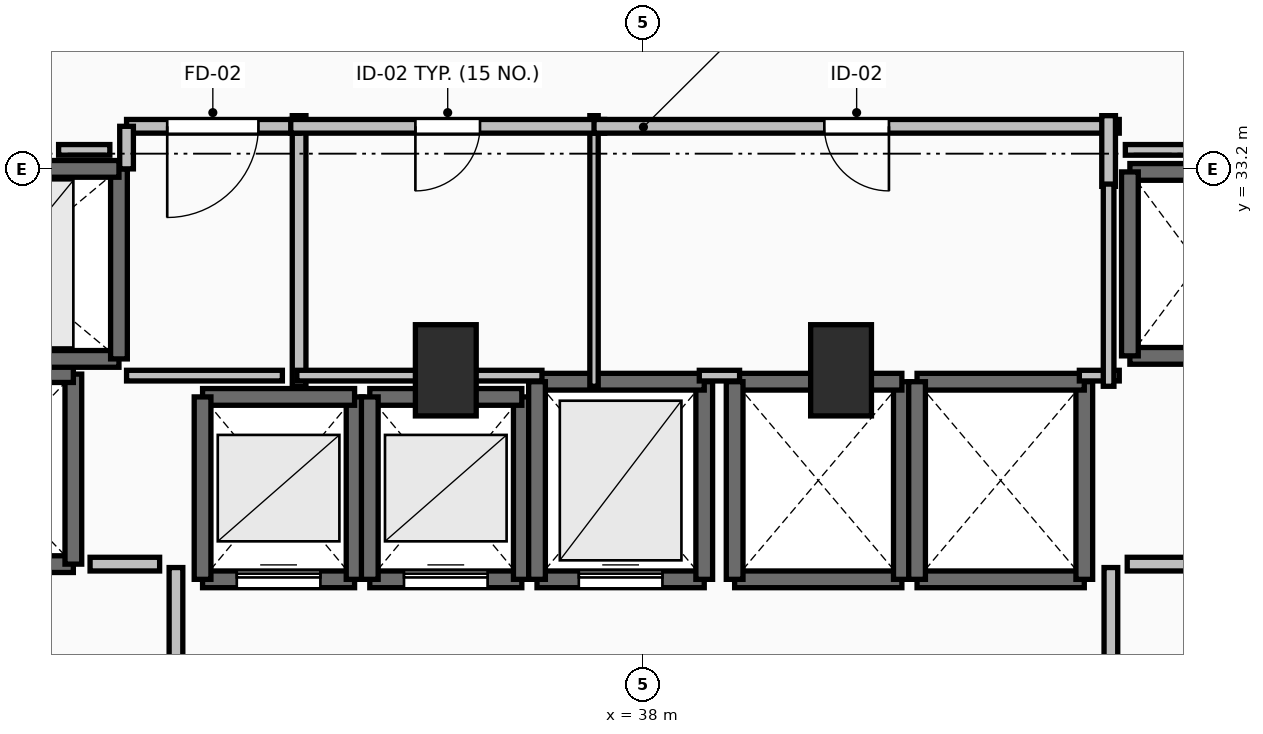
"""IFC4 building model, lengths in metres.
Left out: names, types, materials, properties, quantities, classifications, styles, units other than length and angle.
Written with IfcOpenShell. Run it as: python <this file> out.ifc"""

import sys

from ifc_helpers import new_model, si_unit, direction, frame, frame_2d, origin, origin_2d, place, context, subcontext, project, spatial, rectangle, extrude, element, fill, save


model = new_model("IFC4")
c1 = context("Model", 3, precision=1e-05, world=origin(), true_north=direction((0.0, 1.0)))
c2 = subcontext(c1, "Body", "Model", "MODEL_VIEW")
j1 = project(units=[si_unit("LENGTHUNIT", "METRE"), si_unit("PLANEANGLEUNIT", "RADIAN")], contexts=[c1])
p1 = place(None, origin())
s1 = spatial("IfcSite", under=j1, at=p1, CompositionType="ELEMENT")
p2 = place(p1, origin())
s2 = spatial("IfcBuilding", under=s1, at=p2, CompositionType="ELEMENT")
p3 = place(p2, frame((0.0, 0.0, 62.5)))
s3 = spatial("IfcBuildingStorey", under=s2, at=p3, CompositionType="ELEMENT", Elevation=62.5)
for number, where, z_axis, x_axis in (
    (1, (35.4, 30.55, 0.0), (0.0, 0.0, 1.0), (1.0, 0.0, 0.0)),
    (2, (40.6, 30.55, 0.0), (0.0, 0.0, 1.0), (1.0, 0.0, 0.0)),
):
    element("IfcColumn", number, at=place(p3, frame(where, z_axis=z_axis, x_axis=x_axis)), inside=s3, PredefinedType="PILASTER", context=c2, shape_type="SweptSolid", body=[
        extrude(rectangle(XDim=0.8, YDim=1.2, at=origin_2d()), origin(), (0.0, 0.0, 1.0), 3.5),
    ])
p4 = place(p3, frame((32.2, 27.8, 0.0), z_axis=(0.0, 0.0, 1.0), x_axis=(1.0, 0.0, 0.0)))
e3 = element("IfcWall", 3, at=p4, inside=s3, PredefinedType="SOLIDWALL", context=c2, shape_type="SweptSolid", body=[
    extrude(rectangle(XDim=2.0, YDim=0.22, at=frame_2d((1.0, 0.0))), origin(), (0.0, 0.0, 1.0), 3.24),
])
p5 = place(p4, frame((0.45, 0.0, 0.0)))
e4 = element("IfcOpeningElement", 4, at=p5, cuts=e3, PredefinedType="OPENING", context=c2, shape_type="SweptSolid", body=[
    extrude(rectangle(XDim=1.1, YDim=2.2, at=frame_2d((0.55, 1.1))), frame((0.0, 0.125, 0.0), z_axis=(0.0, -1.0, 0.0), x_axis=(1.0, 0.0, 0.0)), (0.0, 0.0, 1.0), 0.25),
])
p6 = place(p3, frame((34.2, 27.8, 0.0), z_axis=(0.0, 0.0, 1.0), x_axis=(0.0, 1.0, 0.0)))
e5 = element("IfcWall", 5, at=p6, inside=s3, PredefinedType="SOLIDWALL", context=c2, shape_type="SweptSolid", body=[
    extrude(rectangle(XDim=2.4, YDim=0.22, at=frame_2d((1.2, 0.0))), origin(), (0.0, 0.0, 1.0), 3.24),
])
p7 = place(p3, frame((34.2, 30.2, 0.0), z_axis=(0.0, 0.0, 1.0), x_axis=(-1.0, 0.0, 0.0)))
e6 = element("IfcWall", 6, at=p7, inside=s3, PredefinedType="SOLIDWALL", context=c2, shape_type="SweptSolid", body=[
    extrude(rectangle(XDim=2.0, YDim=0.22, at=frame_2d((1.0, 0.0))), origin(), (0.0, 0.0, 1.0), 3.24),
])
p8 = place(p3, frame((32.2, 30.2, 0.0), z_axis=(0.0, 0.0, 1.0), x_axis=(0.0, -1.0, 0.0)))
e7 = element("IfcWall", 7, at=p8, inside=s3, PredefinedType="SOLIDWALL", context=c2, shape_type="SweptSolid", body=[
    extrude(rectangle(XDim=2.4, YDim=0.22, at=frame_2d((1.2, 0.0))), origin(), (0.0, 0.0, 1.0), 3.24),
])
p9 = place(p3, frame((34.4, 27.8, 0.0), z_axis=(0.0, 0.0, 1.0), x_axis=(1.0, 0.0, 0.0)))
e8 = element("IfcWall", 8, at=p9, inside=s3, PredefinedType="SOLIDWALL", context=c2, shape_type="SweptSolid", body=[
    extrude(rectangle(XDim=2.0, YDim=0.22, at=frame_2d((1.0, 0.0))), origin(), (0.0, 0.0, 1.0), 3.24),
])
p10 = place(p9, frame((0.45, 0.0, 0.0)))
e9 = element("IfcOpeningElement", 9, at=p10, cuts=e8, PredefinedType="OPENING", context=c2, shape_type="SweptSolid", body=[
    extrude(rectangle(XDim=1.1, YDim=2.2, at=frame_2d((0.55, 1.1))), frame((0.0, 0.125, 0.0), z_axis=(0.0, -1.0, 0.0), x_axis=(1.0, 0.0, 0.0)), (0.0, 0.0, 1.0), 0.25),
])
p11 = place(p3, frame((36.4, 27.8, 0.0), z_axis=(0.0, 0.0, 1.0), x_axis=(0.0, 1.0, 0.0)))
e10 = element("IfcWall", 10, at=p11, inside=s3, PredefinedType="SOLIDWALL", context=c2, shape_type="SweptSolid", body=[
    extrude(rectangle(XDim=2.4, YDim=0.22, at=frame_2d((1.2, 0.0))), origin(), (0.0, 0.0, 1.0), 3.24),
])
p12 = place(p3, frame((36.4, 30.2, 0.0), z_axis=(0.0, 0.0, 1.0), x_axis=(-1.0, 0.0, 0.0)))
e11 = element("IfcWall", 11, at=p12, inside=s3, PredefinedType="SOLIDWALL", context=c2, shape_type="SweptSolid", body=[
    extrude(rectangle(XDim=2.0, YDim=0.22, at=frame_2d((1.0, 0.0))), origin(), (0.0, 0.0, 1.0), 3.24),
])
p13 = place(p3, frame((34.4, 30.2, 0.0), z_axis=(0.0, 0.0, 1.0), x_axis=(0.0, -1.0, 0.0)))
e12 = element("IfcWall", 12, at=p13, inside=s3, PredefinedType="SOLIDWALL", context=c2, shape_type="SweptSolid", body=[
    extrude(rectangle(XDim=2.4, YDim=0.22, at=frame_2d((1.2, 0.0))), origin(), (0.0, 0.0, 1.0), 3.24),
])
p14 = place(p3, frame((36.6, 27.8, 0.0), z_axis=(0.0, 0.0, 1.0), x_axis=(1.0, 0.0, 0.0)))
e13 = element("IfcWall", 13, at=p14, inside=s3, PredefinedType="SOLIDWALL", context=c2, shape_type="SweptSolid", body=[
    extrude(rectangle(XDim=2.2, YDim=0.22, at=frame_2d((1.1, 0.0))), origin(), (0.0, 0.0, 1.0), 3.24),
])
p15 = place(p14, frame((0.55, 0.0, 0.0)))
e14 = element("IfcOpeningElement", 14, at=p15, cuts=e13, PredefinedType="OPENING", context=c2, shape_type="SweptSolid", body=[
    extrude(rectangle(XDim=1.1, YDim=2.2, at=frame_2d((0.55, 1.1))), frame((0.0, 0.125, 0.0), z_axis=(0.0, -1.0, 0.0), x_axis=(1.0, 0.0, 0.0)), (0.0, 0.0, 1.0), 0.25),
])
p16 = place(p3, frame((38.8, 27.8, 0.0), z_axis=(0.0, 0.0, 1.0), x_axis=(0.0, 1.0, 0.0)))
e15 = element("IfcWall", 15, at=p16, inside=s3, PredefinedType="SOLIDWALL", context=c2, shape_type="SweptSolid", body=[
    extrude(rectangle(XDim=2.6, YDim=0.22, at=frame_2d((1.3, 0.0))), origin(), (0.0, 0.0, 1.0), 3.24),
])
p17 = place(p3, frame((38.8, 30.4, 0.0), z_axis=(0.0, 0.0, 1.0), x_axis=(-1.0, 0.0, 0.0)))
e16 = element("IfcWall", 16, at=p17, inside=s3, PredefinedType="SOLIDWALL", context=c2, shape_type="SweptSolid", body=[
    extrude(rectangle(XDim=2.2, YDim=0.22, at=frame_2d((1.1, 0.0))), origin(), (0.0, 0.0, 1.0), 3.24),
])
p18 = place(p3, frame((36.6, 30.4, 0.0), z_axis=(0.0, 0.0, 1.0), x_axis=(0.0, -1.0, 0.0)))
e17 = element("IfcWall", 17, at=p18, inside=s3, PredefinedType="SOLIDWALL", context=c2, shape_type="SweptSolid", body=[
    extrude(rectangle(XDim=2.6, YDim=0.22, at=frame_2d((1.3, 0.0))), origin(), (0.0, 0.0, 1.0), 3.24),
])
p19 = place(p3, frame((39.2, 27.8, 0.0), z_axis=(0.0, 0.0, 1.0), x_axis=(1.0, 0.0, 0.0)))
e18 = element("IfcWall", 18, at=p19, inside=s3, PredefinedType="SOLIDWALL", context=c2, shape_type="SweptSolid", body=[
    extrude(rectangle(XDim=2.2, YDim=0.22, at=frame_2d((1.1, 0.0))), origin(), (0.0, 0.0, 1.0), 3.24),
])
p20 = place(p3, frame((41.4, 27.8, 0.0), z_axis=(0.0, 0.0, 1.0), x_axis=(0.0, 1.0, 0.0)))
e19 = element("IfcWall", 19, at=p20, inside=s3, PredefinedType="SOLIDWALL", context=c2, shape_type="SweptSolid", body=[
    extrude(rectangle(XDim=2.6, YDim=0.22, at=frame_2d((1.3, 0.0))), origin(), (0.0, 0.0, 1.0), 3.24),
])
p21 = place(p3, frame((41.4, 30.4, 0.0), z_axis=(0.0, 0.0, 1.0), x_axis=(-1.0, 0.0, 0.0)))
e20 = element("IfcWall", 20, at=p21, inside=s3, PredefinedType="SOLIDWALL", context=c2, shape_type="SweptSolid", body=[
    extrude(rectangle(XDim=2.2, YDim=0.22, at=frame_2d((1.1, 0.0))), origin(), (0.0, 0.0, 1.0), 3.24),
])
p22 = place(p3, frame((39.2, 30.4, 0.0), z_axis=(0.0, 0.0, 1.0), x_axis=(0.0, -1.0, 0.0)))
e21 = element("IfcWall", 21, at=p22, inside=s3, PredefinedType="SOLIDWALL", context=c2, shape_type="SweptSolid", body=[
    extrude(rectangle(XDim=2.6, YDim=0.22, at=frame_2d((1.3, 0.0))), origin(), (0.0, 0.0, 1.0), 3.24),
])
p23 = place(p3, frame((41.6, 27.8, 0.0), z_axis=(0.0, 0.0, 1.0), x_axis=(1.0, 0.0, 0.0)))
e22 = element("IfcWall", 22, at=p23, inside=s3, PredefinedType="SOLIDWALL", context=c2, shape_type="SweptSolid", body=[
    extrude(rectangle(XDim=2.2, YDim=0.22, at=frame_2d((1.1, 0.0))), origin(), (0.0, 0.0, 1.0), 3.24),
])
p24 = place(p3, frame((43.8, 27.8, 0.0), z_axis=(0.0, 0.0, 1.0), x_axis=(0.0, 1.0, 0.0)))
e23 = element("IfcWall", 23, at=p24, inside=s3, PredefinedType="SOLIDWALL", context=c2, shape_type="SweptSolid", body=[
    extrude(rectangle(XDim=2.6, YDim=0.22, at=frame_2d((1.3, 0.0))), origin(), (0.0, 0.0, 1.0), 3.24),
])
p25 = place(p3, frame((43.8, 30.4, 0.0), z_axis=(0.0, 0.0, 1.0), x_axis=(-1.0, 0.0, 0.0)))
e24 = element("IfcWall", 24, at=p25, inside=s3, PredefinedType="SOLIDWALL", context=c2, shape_type="SweptSolid", body=[
    extrude(rectangle(XDim=2.2, YDim=0.22, at=frame_2d((1.1, 0.0))), origin(), (0.0, 0.0, 1.0), 3.24),
])
p26 = place(p3, frame((41.6, 30.4, 0.0), z_axis=(0.0, 0.0, 1.0), x_axis=(0.0, -1.0, 0.0)))
e25 = element("IfcWall", 25, at=p26, inside=s3, PredefinedType="SOLIDWALL", context=c2, shape_type="SweptSolid", body=[
    extrude(rectangle(XDim=2.6, YDim=0.22, at=frame_2d((1.3, 0.0))), origin(), (0.0, 0.0, 1.0), 3.24),
])
for number, where, z_axis, x_axis in (
    (26, (44.4, 30.74, 0.0), (0.0, 0.0, 1.0), (1.0, 0.0, 0.0)),
    (27, (46.2, 33.16, 0.0), (0.0, 0.0, 1.0), (-1.0, 0.0, 0.0)),
):
    element("IfcWall", number, at=place(p3, frame(where, z_axis=z_axis, x_axis=x_axis)), inside=s3, PredefinedType="SOLIDWALL", context=c2, shape_type="SweptSolid", body=[
        extrude(rectangle(XDim=1.8, YDim=0.22, at=frame_2d((0.9, 0.0))), origin(), (0.0, 0.0, 1.0), 3.24),
    ])
p27 = place(p3, frame((44.4, 33.16, 0.0), z_axis=(0.0, 0.0, 1.0), x_axis=(0.0, -1.0, 0.0)))
e28 = element("IfcWall", 28, at=p27, inside=s3, PredefinedType="SOLIDWALL", context=c2, shape_type="SweptSolid", body=[
    extrude(rectangle(XDim=2.42, YDim=0.22, at=frame_2d((1.21, 0.0))), origin(), (0.0, 0.0, 1.0), 3.24),
])
p28 = place(p3, frame((28.1, 28.0, 0.0), z_axis=(0.0, 0.0, 1.0), x_axis=(1.0, 0.0, 0.0)))
e29 = element("IfcWall", 29, at=p28, inside=s3, PredefinedType="SHEAR", context=c2, shape_type="SweptSolid", body=[
    extrude(rectangle(XDim=2.4, YDim=0.22, at=frame_2d((1.2, 0.0))), origin(), (0.0, 0.0, 1.0), 3.24),
])
p29 = place(p28, frame((0.6, 0.0, 0.0)))
e30 = element("IfcOpeningElement", 30, at=p29, cuts=e29, PredefinedType="OPENING", context=c2, shape_type="SweptSolid", body=[
    extrude(rectangle(XDim=1.2, YDim=2.2, at=frame_2d((0.6, 1.1))), frame((0.0, 0.125, 0.0), z_axis=(0.0, -1.0, 0.0), x_axis=(1.0, 0.0, 0.0)), (0.0, 0.0, 1.0), 0.25),
])
p30 = place(p3, frame((30.5, 28.0, 0.0), z_axis=(0.0, 0.0, 1.0), x_axis=(0.0, 1.0, 0.0)))
e31 = element("IfcWall", 31, at=p30, inside=s3, PredefinedType="SHEAR", context=c2, shape_type="SweptSolid", body=[
    extrude(rectangle(XDim=2.5, YDim=0.22, at=frame_2d((1.25, 0.0))), origin(), (0.0, 0.0, 1.0), 3.24),
])
p31 = place(p3, frame((30.5, 30.5, 0.0), z_axis=(0.0, 0.0, 1.0), x_axis=(-1.0, 0.0, 0.0)))
e32 = element("IfcWall", 32, at=p31, inside=s3, PredefinedType="SHEAR", context=c2, shape_type="SweptSolid", body=[
    extrude(rectangle(XDim=2.4, YDim=0.22, at=frame_2d((1.2, 0.0))), origin(), (0.0, 0.0, 1.0), 3.24),
])
p32 = place(p3, frame((28.1, 30.7, 0.0), z_axis=(0.0, 0.0, 1.0), x_axis=(1.0, 0.0, 0.0)))
e33 = element("IfcWall", 33, at=p32, inside=s3, PredefinedType="SOLIDWALL", context=c2, shape_type="SweptSolid", body=[
    extrude(rectangle(XDim=3.0, YDim=0.22, at=frame_2d((1.5, 0.0))), origin(), (0.0, 0.0, 1.0), 3.24),
])
p33 = place(p3, frame((31.1, 30.7, 0.0), z_axis=(0.0, 0.0, 1.0), x_axis=(0.0, 1.0, 0.0)))
e34 = element("IfcWall", 34, at=p33, inside=s3, PredefinedType="SOLIDWALL", context=c2, shape_type="SweptSolid", body=[
    extrude(rectangle(XDim=2.5, YDim=0.22, at=frame_2d((1.25, 0.0))), origin(), (0.0, 0.0, 1.0), 3.24),
])
p34 = place(p3, frame((31.1, 33.2, 0.0), z_axis=(0.0, 0.0, 1.0), x_axis=(-1.0, 0.0, 0.0)))
e35 = element("IfcWall", 35, at=p34, inside=s3, PredefinedType="SOLIDWALL", context=c2, shape_type="SweptSolid", body=[
    extrude(rectangle(XDim=3.0, YDim=0.22, at=frame_2d((1.5, 0.0))), origin(), (0.0, 0.0, 1.0), 3.24),
])
p35 = place(p34, frame((0.9, 0.0, 0.0)))
e36 = element("IfcOpeningElement", 36, at=p35, cuts=e35, PredefinedType="OPENING", context=c2, shape_type="SweptSolid", body=[
    extrude(rectangle(XDim=1.2, YDim=2.2, at=frame_2d((0.6, 1.1))), frame((0.0, 0.125, 0.0), z_axis=(0.0, -1.0, 0.0), x_axis=(1.0, 0.0, 0.0)), (0.0, 0.0, 1.0), 0.25),
])
p36 = place(p3, frame((31.85, 24.045, 0.0), z_axis=(0.0, 0.0, 1.0), x_axis=(0.0, 1.0, 0.0)))
e37 = element("IfcWall", 37, at=p36, inside=s3, PredefinedType="PARTITIONING", context=c2, shape_type="SweptSolid", body=[
    extrude(rectangle(XDim=3.91, YDim=0.18, at=frame_2d((1.955, 0.0))), origin(), (0.0, 0.0, 1.0), 3.24),
])
p37 = place(p36, frame((1.355, 0.0, 0.0)))
e38 = element("IfcOpeningElement", 38, at=p37, cuts=e37, PredefinedType="OPENING", context=c2, shape_type="SweptSolid", body=[
    extrude(rectangle(XDim=1.2, YDim=2.15, at=frame_2d((0.6, 1.075))), frame((0.0, 0.105, 0.0), z_axis=(0.0, -1.0, 0.0), x_axis=(1.0, 0.0, 0.0)), (0.0, 0.0, 1.0), 0.21),
])
p38 = place(p3, frame((44.15, 27.955, 0.0), z_axis=(0.0, 0.0, 1.0), x_axis=(0.0, -1.0, 0.0)))
e39 = element("IfcWall", 39, at=p38, inside=s3, PredefinedType="PARTITIONING", context=c2, shape_type="SweptSolid", body=[
    extrude(rectangle(XDim=3.91, YDim=0.18, at=frame_2d((1.955, 0.0))), origin(), (0.0, 0.0, 1.0), 3.24),
])
p39 = place(p38, frame((1.355, 0.0, 0.0)))
e40 = element("IfcOpeningElement", 40, at=p39, cuts=e39, PredefinedType="OPENING", context=c2, shape_type="SweptSolid", body=[
    extrude(rectangle(XDim=1.2, YDim=2.15, at=frame_2d((0.6, 1.075))), frame((0.0, 0.105, 0.0), z_axis=(0.0, -1.0, 0.0), x_axis=(1.0, 0.0, 0.0)), (0.0, 0.0, 1.0), 0.21),
])
p40 = place(p3, frame((33.47, 30.34, 0.0), z_axis=(0.0, 0.0, 1.0), x_axis=(0.0, 1.0, 0.0)))
e41 = element("IfcWall", 41, at=p40, inside=s3, PredefinedType="PARTITIONING", context=c2, shape_type="SweptSolid", body=[
    extrude(rectangle(XDim=3.56, YDim=0.18, at=frame_2d((1.78, 0.0))), origin(), (0.0, 0.0, 1.0), 3.24),
])
p41 = place(p3, frame((33.47, 33.76, 0.0), z_axis=(0.0, 0.0, 1.0), x_axis=(-1.0, 0.0, 0.0)))
e42 = element("IfcWall", 42, at=p41, inside=s3, PredefinedType="PARTITIONING", context=c2, shape_type="SweptSolid", body=[
    extrude(rectangle(XDim=2.27, YDim=0.18, at=frame_2d((1.135, 0.0))), origin(), (0.0, 0.0, 1.0), 3.24),
])
p42 = place(p41, frame((0.535, 0.0, 0.0)))
e43 = element("IfcOpeningElement", 43, at=p42, cuts=e42, PredefinedType="OPENING", context=c2, shape_type="SweptSolid", body=[
    extrude(rectangle(XDim=1.2, YDim=2.15, at=frame_2d((0.6, 1.075))), frame((0.0, 0.105, 0.0), z_axis=(0.0, -1.0, 0.0), x_axis=(1.0, 0.0, 0.0)), (0.0, 0.0, 1.0), 0.21),
])
p43 = place(p3, frame((31.2, 33.76, 0.0), z_axis=(0.0, 0.0, 1.0), x_axis=(0.0, -1.0, 0.0)))
e44 = element("IfcWall", 44, at=p43, inside=s3, PredefinedType="PARTITIONING", context=c2, shape_type="SweptSolid", body=[
    extrude(rectangle(XDim=0.56, YDim=0.18, at=frame_2d((0.28, 0.0))), origin(), (0.0, 0.0, 1.0), 3.24),
])
p44 = place(p3, frame((37.35, 30.34, 0.0), z_axis=(0.0, 0.0, 1.0), x_axis=(0.0, 1.0, 0.0)))
e45 = element("IfcWall", 45, at=p44, inside=s3, PredefinedType="PARTITIONING", context=c2, shape_type="SweptSolid", body=[
    extrude(rectangle(XDim=3.56, YDim=0.11, at=frame_2d((1.78, 0.0))), origin(), (0.0, 0.0, 1.0), 2.432),
])
p45 = place(p3, frame((37.49, 33.76, 0.0), z_axis=(0.0, 0.0, 1.0), x_axis=(-1.0, 0.0, 0.0)))
e46 = element("IfcWall", 46, at=p45, inside=s3, PredefinedType="PARTITIONING", context=c2, shape_type="SweptSolid", body=[
    extrude(rectangle(XDim=4.13, YDim=0.18, at=frame_2d((2.065, 0.0))), origin(), (0.0, 0.0, 1.0), 3.24),
])
p46 = place(p45, frame((1.64, 0.0, 0.0)))
e47 = element("IfcOpeningElement", 47, at=p46, cuts=e46, PredefinedType="OPENING", context=c2, shape_type="SweptSolid", body=[
    extrude(rectangle(XDim=0.85, YDim=2.1, at=frame_2d((0.425, 1.05))), frame((0.0, 0.105, 0.0), z_axis=(0.0, -1.0, 0.0), x_axis=(1.0, 0.0, 0.0)), (0.0, 0.0, 1.0), 0.21),
])
p47 = place(p3, frame((44.26, 33.76, 0.0), z_axis=(0.0, 0.0, 1.0), x_axis=(-1.0, 0.0, 0.0)))
e48 = element("IfcWall", 48, at=p47, inside=s3, PredefinedType="PARTITIONING", context=c2, shape_type="SweptSolid", body=[
    extrude(rectangle(XDim=6.91, YDim=0.18, at=frame_2d((3.455, 0.0))), origin(), (0.0, 0.0, 1.0), 3.24),
])
p48 = place(p47, frame((3.03, 0.0, 0.0)))
e49 = element("IfcOpeningElement", 49, at=p48, cuts=e48, PredefinedType="OPENING", context=c2, shape_type="SweptSolid", body=[
    extrude(rectangle(XDim=0.85, YDim=2.1, at=frame_2d((0.425, 1.05))), frame((0.0, 0.105, 0.0), z_axis=(0.0, -1.0, 0.0), x_axis=(1.0, 0.0, 0.0)), (0.0, 0.0, 1.0), 0.21),
])
p49 = place(p3, frame((44.12, 32.97, 0.0), z_axis=(0.0, 0.0, 1.0), x_axis=(0.0, 1.0, 0.0)))
e50 = element("IfcWall", 50, at=p49, inside=s3, PredefinedType="PARTITIONING", context=c2, shape_type="SweptSolid", body=[
    extrude(rectangle(XDim=0.93, YDim=0.18, at=frame_2d((0.465, 0.0))), origin(), (0.0, 0.0, 1.0), 3.24),
])
for number, where, z_axis, x_axis in (
    (51, (31.635, 28.0, 0.0), (0.0, 0.0, 1.0), (-1.0, 0.0, 0.0)),
    (52, (45.28, 28.0, 0.0), (0.0, 0.0, 1.0), (-1.0, 0.0, 0.0)),
):
    element("IfcWall", number, at=place(p3, frame(where, z_axis=z_axis, x_axis=x_axis)), inside=s3, PredefinedType="PARTITIONING", context=c2, shape_type="SweptSolid", body=[
        extrude(rectangle(XDim=0.915, YDim=0.18, at=frame_2d((0.458, 0.0))), origin(), (0.0, 0.0, 1.0), 3.24),
    ])
p50 = place(p3, frame((31.2, 30.48, 0.0), z_axis=(0.0, 0.0, 1.0), x_axis=(1.0, 0.0, 0.0)))
e53 = element("IfcWall", 53, at=p50, inside=s3, PredefinedType="PARTITIONING", context=c2, shape_type="SweptSolid", body=[
    extrude(rectangle(XDim=2.05, YDim=0.14, at=frame_2d((1.025, 0.0))), origin(), (0.0, 0.0, 1.0), 3.24),
])
p51 = place(p3, frame((33.44, 30.48, 0.0), z_axis=(0.0, 0.0, 1.0), x_axis=(1.0, 0.0, 0.0)))
e54 = element("IfcWall", 54, at=p51, inside=s3, PredefinedType="PARTITIONING", context=c2, shape_type="SweptSolid", body=[
    extrude(rectangle(XDim=3.225, YDim=0.14, at=frame_2d((1.613, 0.0))), origin(), (0.0, 0.0, 1.0), 2.432),
])
p52 = place(p3, frame((38.735, 30.48, 0.0), z_axis=(0.0, 0.0, 1.0), x_axis=(1.0, 0.0, 0.0)))
e55 = element("IfcWall", 55, at=p52, inside=s3, PredefinedType="PARTITIONING", context=c2, shape_type="SweptSolid", body=[
    extrude(rectangle(XDim=0.53, YDim=0.14, at=frame_2d((0.265, 0.0))), origin(), (0.0, 0.0, 1.0), 2.432),
])
p53 = place(p3, frame((43.735, 30.48, 0.0), z_axis=(0.0, 0.0, 1.0), x_axis=(1.0, 0.0, 0.0)))
e56 = element("IfcWall", 56, at=p53, inside=s3, PredefinedType="PARTITIONING", context=c2, shape_type="SweptSolid", body=[
    extrude(rectangle(XDim=0.525, YDim=0.14, at=frame_2d((0.262, 0.0))), origin(), (0.0, 0.0, 1.0), 3.24),
])
p54 = place(p3, frame((44.12, 30.34, 0.0), z_axis=(0.0, 0.0, 1.0), x_axis=(0.0, 1.0, 0.0)))
e57 = element("IfcWall", 57, at=p54, inside=s3, PredefinedType="PARTITIONING", context=c2, shape_type="SweptSolid", body=[
    extrude(rectangle(XDim=2.66, YDim=0.14, at=frame_2d((1.33, 0.0))), origin(), (0.0, 0.0, 1.0), 3.24),
])
p55 = place(p3, frame((44.34, 33.45, 0.0), z_axis=(0.0, 0.0, 1.0), x_axis=(1.0, 0.0, 0.0)))
e58 = element("IfcWall", 58, at=p55, inside=s3, PredefinedType="PARTITIONING", context=c2, shape_type="SweptSolid", body=[
    extrude(rectangle(XDim=4.21, YDim=0.14, at=frame_2d((2.105, 0.0))), origin(), (0.0, 0.0, 1.0), 2.432),
])
p56 = place(p3, frame((30.306, 33.45, 0.0), z_axis=(0.0, 0.0, 1.0), x_axis=(1.0, 0.0, 0.0)))
e59 = element("IfcWall", 59, at=p56, inside=s3, PredefinedType="PARTITIONING", context=c2, shape_type="SweptSolid", body=[
    extrude(rectangle(XDim=0.674, YDim=0.14, at=frame_2d((0.337, 0.0))), origin(), (0.0, 0.0, 1.0), 3.24),
])
p57 = place(p5, origin())
e60 = element("IfcDoor", 60, at=p57, inside=s3, OperationType="SLIDING_TO_LEFT", PredefinedType="DOOR", context=c2, shape_type="SweptSolid", body=[
    extrude(rectangle(XDim=1.1, YDim=2.2, at=frame_2d((0.55, 1.1))), frame((0.0, 0.025, 0.0), z_axis=(0.0, -1.0, 0.0), x_axis=(1.0, 0.0, 0.0)), (0.0, 0.0, 1.0), 0.05),
])
fill(e4, e60)
p58 = place(p10, origin())
e61 = element("IfcDoor", 61, at=p58, inside=s3, OperationType="SLIDING_TO_LEFT", PredefinedType="DOOR", context=c2, shape_type="SweptSolid", body=[
    extrude(rectangle(XDim=1.1, YDim=2.2, at=frame_2d((0.55, 1.1))), frame((0.0, 0.025, 0.0), z_axis=(0.0, -1.0, 0.0), x_axis=(1.0, 0.0, 0.0)), (0.0, 0.0, 1.0), 0.05),
])
fill(e9, e61)
p59 = place(p15, origin())
e62 = element("IfcDoor", 62, at=p59, inside=s3, OperationType="SLIDING_TO_LEFT", PredefinedType="DOOR", context=c2, shape_type="SweptSolid", body=[
    extrude(rectangle(XDim=1.1, YDim=2.2, at=frame_2d((0.55, 1.1))), frame((0.0, 0.025, 0.0), z_axis=(0.0, -1.0, 0.0), x_axis=(1.0, 0.0, 0.0)), (0.0, 0.0, 1.0), 0.05),
])
fill(e14, e62)
p60 = place(p42, origin())
e63 = element("IfcDoor", 63, at=p60, inside=s3, OperationType="SINGLE_SWING_RIGHT", PredefinedType="DOOR", context=c2, shape_type="SweptSolid", body=[
    extrude(rectangle(XDim=1.2, YDim=2.15, at=frame_2d((0.6, 1.075))), frame((0.0, 0.025, 0.0), z_axis=(0.0, -1.0, 0.0), x_axis=(1.0, 0.0, 0.0)), (0.0, 0.0, 1.0), 0.05),
])
fill(e43, e63)
p61 = place(p46, origin())
e64 = element("IfcDoor", 64, at=p61, inside=s3, OperationType="SINGLE_SWING_RIGHT", PredefinedType="DOOR", context=c2, shape_type="SweptSolid", body=[
    extrude(rectangle(XDim=0.85, YDim=2.1, at=frame_2d((0.425, 1.05))), frame((0.0, 0.025, 0.0), z_axis=(0.0, -1.0, 0.0), x_axis=(1.0, 0.0, 0.0)), (0.0, 0.0, 1.0), 0.05),
])
fill(e47, e64)
p62 = place(p48, origin())
e65 = element("IfcDoor", 65, at=p62, inside=s3, OperationType="SINGLE_SWING_LEFT", PredefinedType="DOOR", context=c2, shape_type="SweptSolid", body=[
    extrude(rectangle(XDim=0.85, YDim=2.1, at=frame_2d((0.425, 1.05))), frame((0.0, 0.025, 0.0), z_axis=(0.0, -1.0, 0.0), x_axis=(1.0, 0.0, 0.0)), (0.0, 0.0, 1.0), 0.05),
])
fill(e49, e65)
save(model, sys.argv[1])
